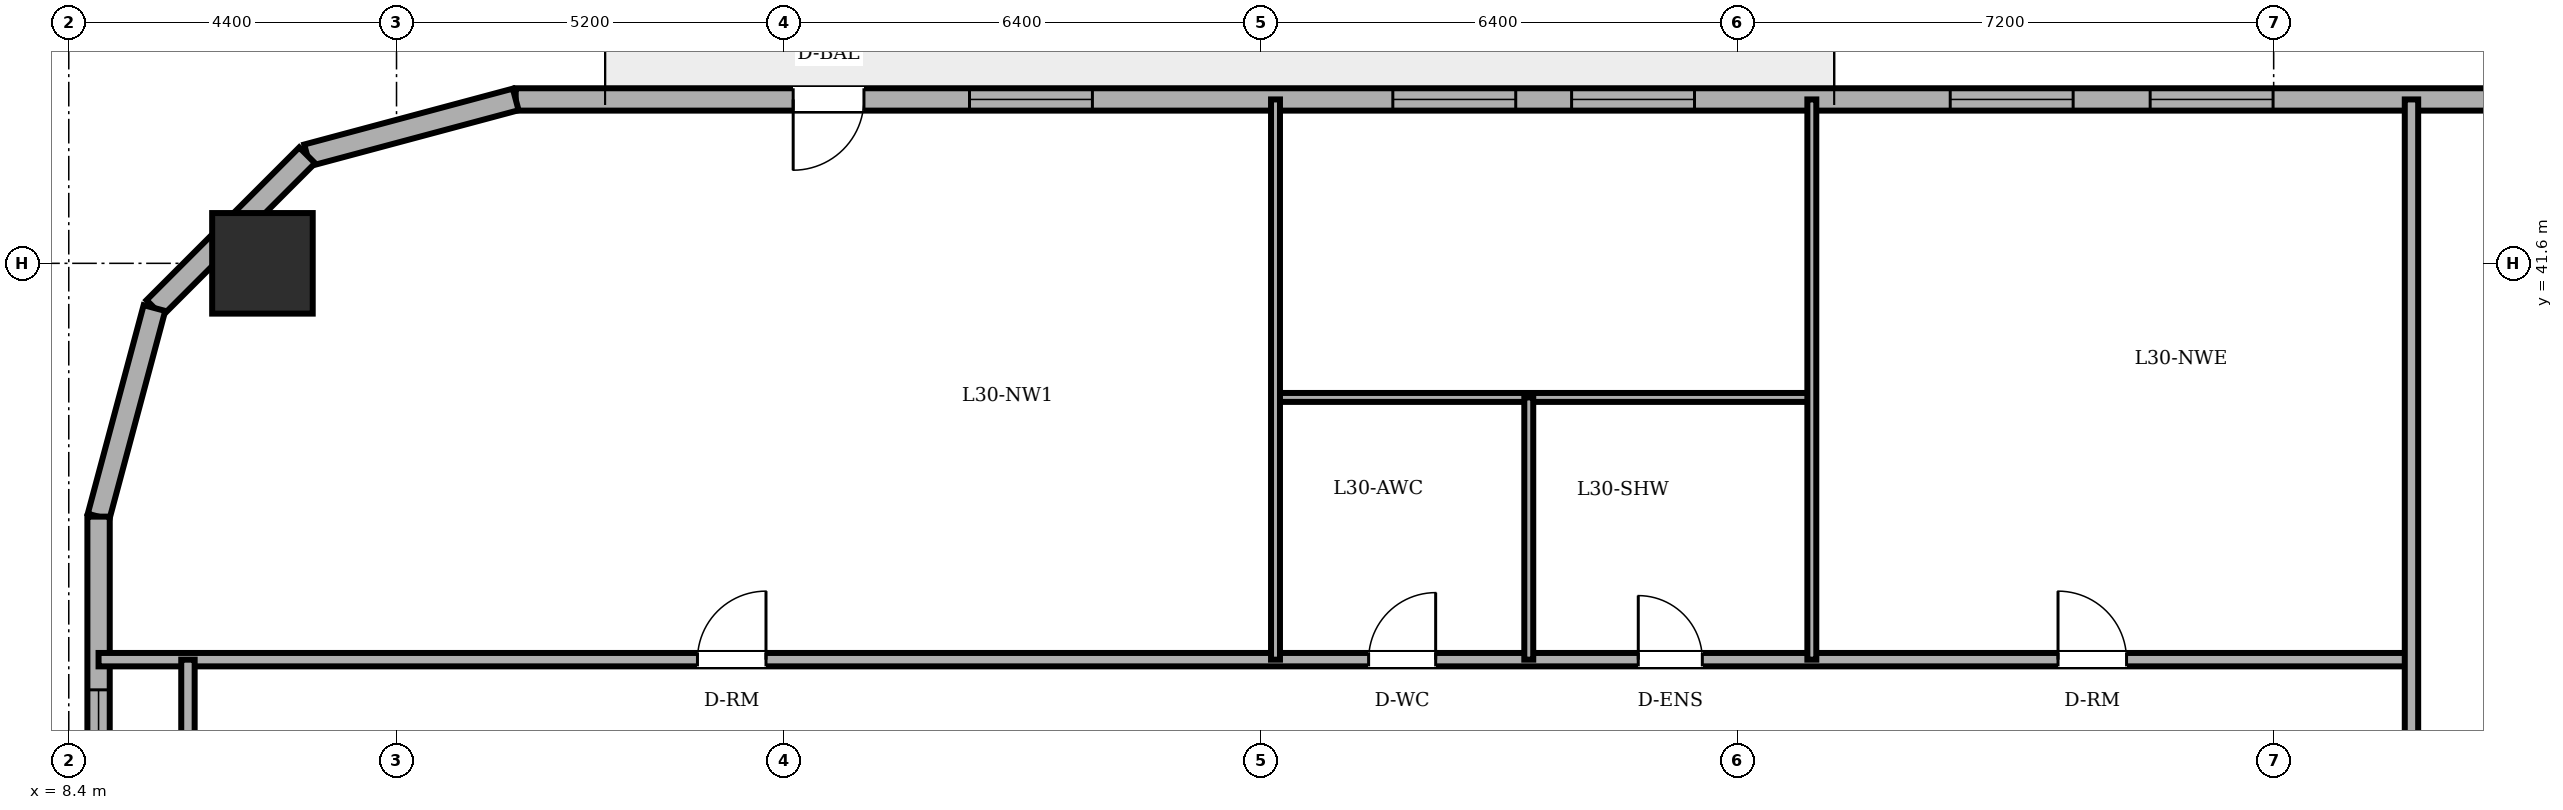
"""IFC4 building model, lengths in metres.
Left out: names, types, materials, properties, quantities, classifications, styles, units other than length and angle.
Written with IfcOpenShell. Run it as: python <this file> out.ifc"""

import sys

from ifc_helpers import new_model, si_unit, direction, frame, frame_2d, origin, origin_2d, place, context, subcontext, project, spatial, rectangle, circle, extrude, element, fill, save


model = new_model("IFC4")
c1 = context("Model", 3, precision=1e-05, world=origin(), true_north=direction((0.0, 1.0)))
c2 = subcontext(c1, "Body", "Model", "MODEL_VIEW")
j1 = project(units=[si_unit("LENGTHUNIT", "METRE"), si_unit("PLANEANGLEUNIT", "RADIAN")], contexts=[c1])
p1 = place(None, origin())
s1 = spatial("IfcSite", under=j1, at=p1, CompositionType="ELEMENT")
p2 = place(p1, origin())
s2 = spatial("IfcBuilding", under=s1, at=p2, CompositionType="ELEMENT")
p3 = place(p2, frame((0.0, 0.0, 115.1)))
s3 = spatial("IfcBuildingStorey", under=s2, at=p3, CompositionType="ELEMENT", Elevation=115.1)
p4 = place(p3, frame((11.0, 41.6, 0.0), z_axis=(0.0, 0.0, 1.0), x_axis=(1.0, 0.0, 0.0)))
e1 = element("IfcColumn", 1, at=p4, inside=s3, PredefinedType="COLUMN", context=c2, shape_type="SweptSolid", body=[
    extrude(circle(Radius=0.675, at=origin_2d()), origin(), (0.0, 0.0, 1.0), 3.6),
])
p5 = place(p3, frame((44.333, 43.8, 0.0), z_axis=(0.0, 0.0, 1.0), x_axis=(-1.0, 0.0, 0.0)))
e2 = element("IfcWall", 2, at=p5, inside=s3, PredefinedType="SOLIDWALL", context=c2, shape_type="SweptSolid", body=[
    extrude(rectangle(XDim=29.933, YDim=0.3, at=frame_2d((14.967, 0.0))), origin(), (0.0, 0.0, 1.0), 3.4),
])
p6 = place(p5, frame((25.258, 0.0, 0.0)))
e3 = element("IfcOpeningElement", 3, at=p6, cuts=e2, PredefinedType="OPENING", context=c2, shape_type="SweptSolid", body=[
    extrude(rectangle(XDim=0.95, YDim=2.2, at=frame_2d((0.475, 1.1))), frame((0.0, 0.16, 0.0), z_axis=(0.0, -1.0, 0.0), x_axis=(1.0, 0.0, 0.0)), (0.0, 0.0, 1.0), 0.32),
])
p7 = place(p5, frame((1.729, 0.0, 0.85)))
e4 = element("IfcOpeningElement", 4, at=p7, cuts=e2, PredefinedType="OPENING", context=c2, shape_type="SweptSolid", body=[
    extrude(rectangle(XDim=1.65, YDim=1.55, at=frame_2d((0.825, 0.775))), frame((0.0, 0.16, 0.0), z_axis=(0.0, -1.0, 0.0), x_axis=(1.0, 0.0, 0.0)), (0.0, 0.0, 1.0), 0.32),
])
p8 = place(p5, frame((6.341, 0.0, 0.85)))
e5 = element("IfcOpeningElement", 5, at=p8, cuts=e2, PredefinedType="OPENING", context=c2, shape_type="SweptSolid", body=[
    extrude(rectangle(XDim=1.65, YDim=1.55, at=frame_2d((0.825, 0.775))), frame((0.0, 0.16, 0.0), z_axis=(0.0, -1.0, 0.0), x_axis=(1.0, 0.0, 0.0)), (0.0, 0.0, 1.0), 0.32),
])
p9 = place(p5, frame((9.025, 0.0, 0.85)))
e6 = element("IfcOpeningElement", 6, at=p9, cuts=e2, PredefinedType="OPENING", context=c2, shape_type="SweptSolid", body=[
    extrude(rectangle(XDim=1.65, YDim=1.55, at=frame_2d((0.825, 0.775))), frame((0.0, 0.16, 0.0), z_axis=(0.0, -1.0, 0.0), x_axis=(1.0, 0.0, 0.0)), (0.0, 0.0, 1.0), 0.32),
])
p10 = place(p5, frame((14.108, 0.0, 0.85)))
e7 = element("IfcOpeningElement", 7, at=p10, cuts=e2, PredefinedType="OPENING", context=c2, shape_type="SweptSolid", body=[
    extrude(rectangle(XDim=1.65, YDim=1.55, at=frame_2d((0.825, 0.775))), frame((0.0, 0.16, 0.0), z_axis=(0.0, -1.0, 0.0), x_axis=(1.0, 0.0, 0.0)), (0.0, 0.0, 1.0), 0.32),
])
p11 = place(p5, frame((16.508, 0.0, 0.85)))
e8 = element("IfcOpeningElement", 8, at=p11, cuts=e2, PredefinedType="OPENING", context=c2, shape_type="SweptSolid", body=[
    extrude(rectangle(XDim=1.65, YDim=1.55, at=frame_2d((0.825, 0.775))), frame((0.0, 0.16, 0.0), z_axis=(0.0, -1.0, 0.0), x_axis=(1.0, 0.0, 0.0)), (0.0, 0.0, 1.0), 0.32),
])
p12 = place(p5, frame((22.191, 0.0, 0.85)))
e9 = element("IfcOpeningElement", 9, at=p12, cuts=e2, PredefinedType="OPENING", context=c2, shape_type="SweptSolid", body=[
    extrude(rectangle(XDim=1.65, YDim=1.55, at=frame_2d((0.825, 0.775))), frame((0.0, 0.16, 0.0), z_axis=(0.0, -1.0, 0.0), x_axis=(1.0, 0.0, 0.0)), (0.0, 0.0, 1.0), 0.32),
])
p13 = place(p3, frame((14.4, 43.8, 0.0), z_axis=(0.0, 0.0, 1.0), x_axis=(-0.965943540406, -0.258752926066, 0.0)))
e10 = element("IfcWall", 10, at=p13, inside=s3, PredefinedType="SOLIDWALL", context=c2, shape_type="SweptSolid", body=[
    extrude(rectangle(XDim=2.898, YDim=0.3, at=frame_2d((1.449, 0.0))), origin(), (0.0, 0.0, 1.0), 3.4),
])
p14 = place(p3, frame((11.6, 43.05, 0.0), z_axis=(0.0, 0.0, 1.0), x_axis=(-0.707106781187, -0.707106781187, 0.0)))
e11 = element("IfcWall", 11, at=p14, inside=s3, PredefinedType="SOLIDWALL", context=c2, shape_type="SweptSolid", body=[
    extrude(rectangle(XDim=2.899, YDim=0.3, at=frame_2d((1.45, 0.0))), origin(), (0.0, 0.0, 1.0), 3.4),
])
p15 = place(p3, frame((9.55, 41.0, 0.0), z_axis=(0.0, 0.0, 1.0), x_axis=(-0.258731875344, -0.96594917914, 0.0)))
e12 = element("IfcWall", 12, at=p15, inside=s3, PredefinedType="SOLIDWALL", context=c2, shape_type="SweptSolid", body=[
    extrude(rectangle(XDim=2.899, YDim=0.3, at=frame_2d((1.449, 0.0))), origin(), (0.0, 0.0, 1.0), 3.4),
])
p16 = place(p3, frame((8.8, 38.2, 0.0), z_axis=(0.0, 0.0, 1.0), x_axis=(0.0, -1.0, 0.0)))
e13 = element("IfcWall", 13, at=p16, inside=s3, PredefinedType="SOLIDWALL", context=c2, shape_type="SweptSolid", body=[
    extrude(rectangle(XDim=28.4, YDim=0.3, at=frame_2d((14.2, 0.0))), origin(), (0.0, 0.0, 1.0), 3.4),
])
p17 = place(p16, frame((2.325, 0.0, 0.85)))
e14 = element("IfcOpeningElement", 14, at=p17, cuts=e13, PredefinedType="OPENING", context=c2, shape_type="SweptSolid", body=[
    extrude(rectangle(XDim=1.65, YDim=1.55, at=frame_2d((0.825, 0.775))), frame((0.0, 0.16, 0.0), z_axis=(0.0, -1.0, 0.0), x_axis=(1.0, 0.0, 0.0)), (0.0, 0.0, 1.0), 0.32),
])
p18 = place(p16, frame((6.828, 0.0, 0.85)))
e15 = element("IfcOpeningElement", 15, at=p18, cuts=e13, PredefinedType="OPENING", context=c2, shape_type="SweptSolid", body=[
    extrude(rectangle(XDim=1.65, YDim=1.55, at=frame_2d((0.825, 0.775))), frame((0.0, 0.16, 0.0), z_axis=(0.0, -1.0, 0.0), x_axis=(1.0, 0.0, 0.0)), (0.0, 0.0, 1.0), 0.32),
])
p19 = place(p16, frame((10.102, 0.0, 0.85)))
e16 = element("IfcOpeningElement", 16, at=p19, cuts=e13, PredefinedType="OPENING", context=c2, shape_type="SweptSolid", body=[
    extrude(rectangle(XDim=1.65, YDim=1.55, at=frame_2d((0.825, 0.775))), frame((0.0, 0.16, 0.0), z_axis=(0.0, -1.0, 0.0), x_axis=(1.0, 0.0, 0.0)), (0.0, 0.0, 1.0), 0.32),
])
p20 = place(p16, frame((16.648, 0.0, 0.85)))
e17 = element("IfcOpeningElement", 17, at=p20, cuts=e13, PredefinedType="OPENING", context=c2, shape_type="SweptSolid", body=[
    extrude(rectangle(XDim=1.65, YDim=1.55, at=frame_2d((0.825, 0.775))), frame((0.0, 0.16, 0.0), z_axis=(0.0, -1.0, 0.0), x_axis=(1.0, 0.0, 0.0)), (0.0, 0.0, 1.0), 0.32),
])
p21 = place(p16, frame((19.922, 0.0, 0.85)))
e18 = element("IfcOpeningElement", 18, at=p21, cuts=e13, PredefinedType="OPENING", context=c2, shape_type="SweptSolid", body=[
    extrude(rectangle(XDim=1.65, YDim=1.55, at=frame_2d((0.825, 0.775))), frame((0.0, 0.16, 0.0), z_axis=(0.0, -1.0, 0.0), x_axis=(1.0, 0.0, 0.0)), (0.0, 0.0, 1.0), 0.32),
])
p22 = place(p16, frame((24.425, 0.0, 0.85)))
e19 = element("IfcOpeningElement", 19, at=p22, cuts=e13, PredefinedType="OPENING", context=c2, shape_type="SweptSolid", body=[
    extrude(rectangle(XDim=1.65, YDim=1.55, at=frame_2d((0.825, 0.775))), frame((0.0, 0.16, 0.0), z_axis=(0.0, -1.0, 0.0), x_axis=(1.0, 0.0, 0.0)), (0.0, 0.0, 1.0), 0.32),
])
p23 = place(p3, frame((8.8, 36.28, 0.0), z_axis=(0.0, 0.0, 1.0), x_axis=(1.0, 0.0, 0.0)))
e20 = element("IfcWall", 20, at=p23, inside=s3, PredefinedType="PARTITIONING", context=c2, shape_type="SweptSolid", body=[
    extrude(rectangle(XDim=31.05, YDim=0.18, at=frame_2d((15.525, 0.0))), origin(), (0.0, 0.0, 1.0), 3.4),
])
p24 = place(p23, frame((17.05, 0.0, 0.0)))
e21 = element("IfcOpeningElement", 21, at=p24, cuts=e20, PredefinedType="OPENING", context=c2, shape_type="SweptSolid", body=[
    extrude(rectangle(XDim=0.9, YDim=2.1, at=frame_2d((0.45, 1.05))), frame((0.0, 0.1, 0.0), z_axis=(0.0, -1.0, 0.0), x_axis=(1.0, 0.0, 0.0)), (0.0, 0.0, 1.0), 0.2),
])
p25 = place(p23, frame((20.67, 0.0, 0.0)))
e22 = element("IfcOpeningElement", 22, at=p25, cuts=e20, PredefinedType="OPENING", context=c2, shape_type="SweptSolid", body=[
    extrude(rectangle(XDim=0.86, YDim=2.1, at=frame_2d((0.43, 1.05))), frame((0.0, 0.1, 0.0), z_axis=(0.0, -1.0, 0.0), x_axis=(1.0, 0.0, 0.0)), (0.0, 0.0, 1.0), 0.2),
])
p26 = place(p23, frame((8.04, 0.0, 0.0)))
e23 = element("IfcOpeningElement", 23, at=p26, cuts=e20, PredefinedType="OPENING", context=c2, shape_type="SweptSolid", body=[
    extrude(rectangle(XDim=0.92, YDim=2.1, at=frame_2d((0.46, 1.05))), frame((0.0, 0.1, 0.0), z_axis=(0.0, -1.0, 0.0), x_axis=(1.0, 0.0, 0.0)), (0.0, 0.0, 1.0), 0.2),
])
p27 = place(p23, frame((26.305, 0.0, 0.0)))
e24 = element("IfcOpeningElement", 24, at=p27, cuts=e20, PredefinedType="OPENING", context=c2, shape_type="SweptSolid", body=[
    extrude(rectangle(XDim=0.92, YDim=2.1, at=frame_2d((0.46, 1.05))), frame((0.0, 0.1, 0.0), z_axis=(0.0, -1.0, 0.0), x_axis=(1.0, 0.0, 0.0)), (0.0, 0.0, 1.0), 0.2),
])
p28 = place(p3, frame((24.6, 39.8, 0.0), z_axis=(0.0, 0.0, 1.0), x_axis=(1.0, 0.0, 0.0)))
e25 = element("IfcWall", 25, at=p28, inside=s3, PredefinedType="PARTITIONING", context=c2, shape_type="SweptSolid", body=[
    extrude(rectangle(XDim=7.2, YDim=0.12, at=frame_2d((3.6, 0.0))), origin(), (0.0, 0.0, 1.0), 3.4),
])
p29 = place(p3, frame((10.0, 33.82, 0.0), z_axis=(0.0, 0.0, 1.0), x_axis=(0.0, 1.0, 0.0)))
e26 = element("IfcWall", 26, at=p29, inside=s3, PredefinedType="PARTITIONING", context=c2, shape_type="SweptSolid", body=[
    extrude(rectangle(XDim=2.46, YDim=0.18, at=frame_2d((1.23, 0.0))), origin(), (0.0, 0.0, 1.0), 3.4),
])
p30 = place(p3, frame((24.6, 36.28, 0.0), z_axis=(0.0, 0.0, 1.0), x_axis=(0.0, 1.0, 0.0)))
e27 = element("IfcWall", 27, at=p30, inside=s3, PredefinedType="PARTITIONING", context=c2, shape_type="SweptSolid", body=[
    extrude(rectangle(XDim=7.52, YDim=0.12, at=frame_2d((3.76, 0.0))), origin(), (0.0, 0.0, 1.0), 3.4),
])
p31 = place(p3, frame((28.0, 36.28, 0.0), z_axis=(0.0, 0.0, 1.0), x_axis=(0.0, 1.0, 0.0)))
e28 = element("IfcWall", 28, at=p31, inside=s3, PredefinedType="PARTITIONING", context=c2, shape_type="SweptSolid", body=[
    extrude(rectangle(XDim=3.52, YDim=0.12, at=frame_2d((1.76, 0.0))), origin(), (0.0, 0.0, 1.0), 3.4),
])
p32 = place(p3, frame((31.8, 36.28, 0.0), z_axis=(0.0, 0.0, 1.0), x_axis=(0.0, 1.0, 0.0)))
e29 = element("IfcWall", 29, at=p32, inside=s3, PredefinedType="PARTITIONING", context=c2, shape_type="SweptSolid", body=[
    extrude(rectangle(XDim=7.52, YDim=0.12, at=frame_2d((3.76, 0.0))), origin(), (0.0, 0.0, 1.0), 3.4),
])
p33 = place(p3, frame((39.85, 25.18, 0.0), z_axis=(0.0, 0.0, 1.0), x_axis=(0.0, 1.0, 0.0)))
e30 = element("IfcWall", 30, at=p33, inside=s3, PredefinedType="PARTITIONING", context=c2, shape_type="SweptSolid", body=[
    extrude(rectangle(XDim=18.62, YDim=0.18, at=frame_2d((9.31, 0.0))), origin(), (0.0, 0.0, 1.0), 3.4),
])
p34 = place(p33, frame((5.35, 0.0, 0.0)))
e31 = element("IfcOpeningElement", 31, at=p34, cuts=e30, PredefinedType="OPENING", context=c2, shape_type="SweptSolid", body=[
    extrude(rectangle(XDim=0.92, YDim=2.1, at=frame_2d((0.46, 1.05))), frame((0.0, 0.1, 0.0), z_axis=(0.0, -1.0, 0.0), x_axis=(1.0, 0.0, 0.0)), (0.0, 0.0, 1.0), 0.2),
])
p35 = place(p6, origin())
e32 = element("IfcDoor", 32, at=p35, inside=s3, OperationType="SINGLE_SWING_RIGHT", PredefinedType="DOOR", context=c2, shape_type="SweptSolid", body=[
    extrude(rectangle(XDim=0.95, YDim=2.2, at=frame_2d((0.475, 1.1))), frame((0.0, 0.025, 0.0), z_axis=(0.0, -1.0, 0.0), x_axis=(1.0, 0.0, 0.0)), (0.0, 0.0, 1.0), 0.05),
])
fill(e3, e32)
p36 = place(p8, origin())
e33 = element("IfcWindow", 33, at=p36, inside=s3, PartitioningType="DOUBLE_PANEL_VERTICAL", PredefinedType="WINDOW", context=c2, shape_type="SweptSolid", body=[
    extrude(rectangle(XDim=1.65, YDim=1.55, at=frame_2d((0.825, 0.775))), frame((0.0, 0.03, 0.0), z_axis=(0.0, -1.0, 0.0), x_axis=(1.0, 0.0, 0.0)), (0.0, 0.0, 1.0), 0.06),
])
fill(e5, e33)
p37 = place(p9, origin())
e34 = element("IfcWindow", 34, at=p37, inside=s3, PartitioningType="DOUBLE_PANEL_VERTICAL", PredefinedType="WINDOW", context=c2, shape_type="SweptSolid", body=[
    extrude(rectangle(XDim=1.65, YDim=1.55, at=frame_2d((0.825, 0.775))), frame((0.0, 0.03, 0.0), z_axis=(0.0, -1.0, 0.0), x_axis=(1.0, 0.0, 0.0)), (0.0, 0.0, 1.0), 0.06),
])
fill(e6, e34)
p38 = place(p10, origin())
e35 = element("IfcWindow", 35, at=p38, inside=s3, PartitioningType="DOUBLE_PANEL_VERTICAL", PredefinedType="WINDOW", context=c2, shape_type="SweptSolid", body=[
    extrude(rectangle(XDim=1.65, YDim=1.55, at=frame_2d((0.825, 0.775))), frame((0.0, 0.03, 0.0), z_axis=(0.0, -1.0, 0.0), x_axis=(1.0, 0.0, 0.0)), (0.0, 0.0, 1.0), 0.06),
])
fill(e7, e35)
p39 = place(p11, origin())
e36 = element("IfcWindow", 36, at=p39, inside=s3, PartitioningType="DOUBLE_PANEL_VERTICAL", PredefinedType="WINDOW", context=c2, shape_type="SweptSolid", body=[
    extrude(rectangle(XDim=1.65, YDim=1.55, at=frame_2d((0.825, 0.775))), frame((0.0, 0.03, 0.0), z_axis=(0.0, -1.0, 0.0), x_axis=(1.0, 0.0, 0.0)), (0.0, 0.0, 1.0), 0.06),
])
fill(e8, e36)
p40 = place(p12, origin())
e37 = element("IfcWindow", 37, at=p40, inside=s3, PartitioningType="DOUBLE_PANEL_VERTICAL", PredefinedType="WINDOW", context=c2, shape_type="SweptSolid", body=[
    extrude(rectangle(XDim=1.65, YDim=1.55, at=frame_2d((0.825, 0.775))), frame((0.0, 0.03, 0.0), z_axis=(0.0, -1.0, 0.0), x_axis=(1.0, 0.0, 0.0)), (0.0, 0.0, 1.0), 0.06),
])
fill(e9, e37)
p41 = place(p17, origin())
e38 = element("IfcWindow", 38, at=p41, inside=s3, PartitioningType="DOUBLE_PANEL_VERTICAL", PredefinedType="WINDOW", context=c2, shape_type="SweptSolid", body=[
    extrude(rectangle(XDim=1.65, YDim=1.55, at=frame_2d((0.825, 0.775))), frame((0.0, 0.03, 0.0), z_axis=(0.0, -1.0, 0.0), x_axis=(1.0, 0.0, 0.0)), (0.0, 0.0, 1.0), 0.06),
])
fill(e14, e38)
p42 = place(p24, origin())
e39 = element("IfcDoor", 39, at=p42, inside=s3, OperationType="SINGLE_SWING_RIGHT", PredefinedType="DOOR", context=c2, shape_type="SweptSolid", body=[
    extrude(rectangle(XDim=0.9, YDim=2.1, at=frame_2d((0.45, 1.05))), frame((0.0, 0.025, 0.0), z_axis=(0.0, -1.0, 0.0), x_axis=(1.0, 0.0, 0.0)), (0.0, 0.0, 1.0), 0.05),
])
fill(e21, e39)
p43 = place(p25, origin())
e40 = element("IfcDoor", 40, at=p43, inside=s3, OperationType="SINGLE_SWING_LEFT", PredefinedType="DOOR", context=c2, shape_type="SweptSolid", body=[
    extrude(rectangle(XDim=0.86, YDim=2.1, at=frame_2d((0.43, 1.05))), frame((0.0, 0.025, 0.0), z_axis=(0.0, -1.0, 0.0), x_axis=(1.0, 0.0, 0.0)), (0.0, 0.0, 1.0), 0.05),
])
fill(e22, e40)
p44 = place(p26, origin())
e41 = element("IfcDoor", 41, at=p44, inside=s3, OperationType="SINGLE_SWING_RIGHT", PredefinedType="DOOR", context=c2, shape_type="SweptSolid", body=[
    extrude(rectangle(XDim=0.92, YDim=2.1, at=frame_2d((0.46, 1.05))), frame((0.0, 0.025, 0.0), z_axis=(0.0, -1.0, 0.0), x_axis=(1.0, 0.0, 0.0)), (0.0, 0.0, 1.0), 0.05),
])
fill(e23, e41)
p45 = place(p27, origin())
e42 = element("IfcDoor", 42, at=p45, inside=s3, OperationType="SINGLE_SWING_LEFT", PredefinedType="DOOR", context=c2, shape_type="SweptSolid", body=[
    extrude(rectangle(XDim=0.92, YDim=2.1, at=frame_2d((0.46, 1.05))), frame((0.0, 0.025, 0.0), z_axis=(0.0, -1.0, 0.0), x_axis=(1.0, 0.0, 0.0)), (0.0, 0.0, 1.0), 0.05),
])
fill(e24, e42)
save(model, sys.argv[1])
